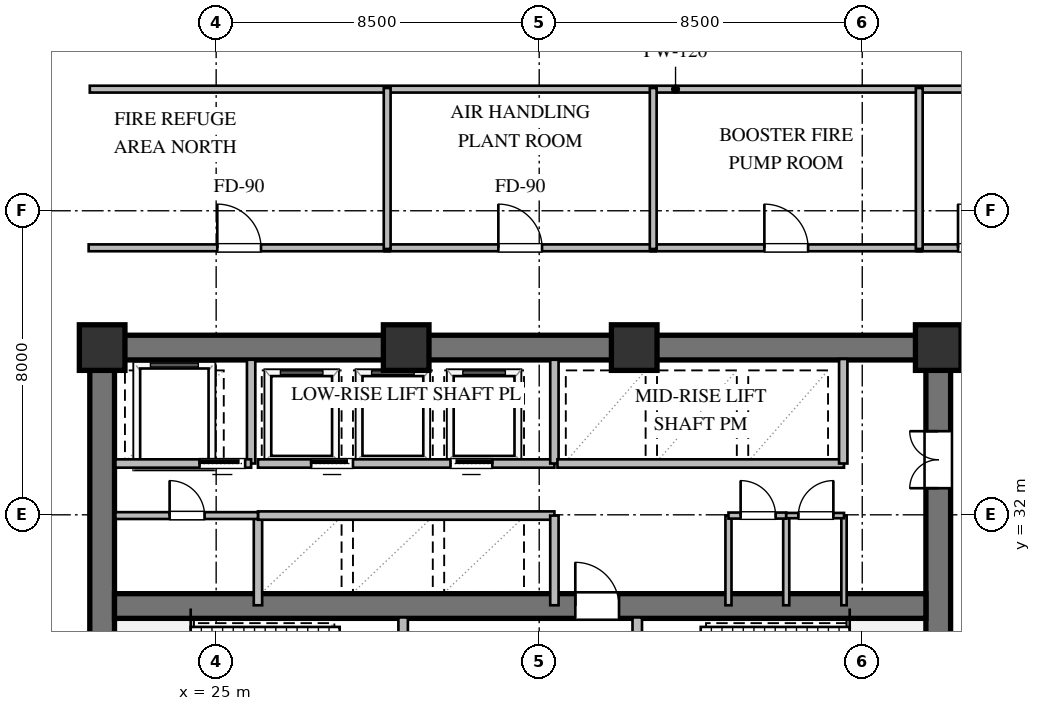
"""IFC4 building model, lengths in metres.
Left out: names, types, materials, properties, quantities, classifications, styles, units other than length and angle.
Written with IfcOpenShell. Run it as: python <this file> out.ifc"""

import sys

from ifc_helpers import new_model, si_unit, direction, frame, frame_2d, origin, origin_2d, place, context, subcontext, project, spatial, rectangle, extrude, element, fill, save


model = new_model("IFC4")
c1 = context("Model", 3, precision=1e-05, world=origin(), true_north=direction((0.0, 1.0)))
c2 = subcontext(c1, "Body", "Model", "MODEL_VIEW")
j1 = project(units=[si_unit("LENGTHUNIT", "METRE"), si_unit("PLANEANGLEUNIT", "RADIAN")], contexts=[c1])
p1 = place(None, origin())
s1 = spatial("IfcSite", under=j1, at=p1, CompositionType="ELEMENT")
p2 = place(p1, origin())
s2 = spatial("IfcBuilding", under=s1, at=p2, CompositionType="ELEMENT")
p3 = place(p2, frame((0.0, 0.0, 92.4)))
s3 = spatial("IfcBuildingStorey", under=s2, at=p3, CompositionType="ELEMENT", Elevation=92.4)
p4 = place(p3, frame((21.675, 36.4, 0.0), z_axis=(0.0, 0.0, 1.0), x_axis=(1.0, 0.0, 0.0)))
e1 = element("IfcWall", 1, at=p4, inside=s3, PredefinedType="SHEAR", context=c2, shape_type="SweptSolid", body=[
    extrude(rectangle(XDim=22.65, YDim=0.65, at=frame_2d((11.325, 0.0))), origin(), (0.0, 0.0, 1.0), 5.08),
])
p5 = place(p3, frame((22.0, 23.925, 0.0), z_axis=(0.0, 0.0, 1.0), x_axis=(0.0, 1.0, 0.0)))
e2 = element("IfcWall", 2, at=p5, inside=s3, PredefinedType="SHEAR", context=c2, shape_type="SweptSolid", body=[
    extrude(rectangle(XDim=12.15, YDim=0.65, at=frame_2d((6.075, 0.0))), origin(), (0.0, 0.0, 1.0), 5.08),
])
p6 = place(p3, frame((44.0, 23.925, 0.0), z_axis=(0.0, 0.0, 1.0), x_axis=(0.0, 1.0, 0.0)))
e3 = element("IfcWall", 3, at=p6, inside=s3, PredefinedType="SHEAR", context=c2, shape_type="SweptSolid", body=[
    extrude(rectangle(XDim=12.15, YDim=0.65, at=frame_2d((6.075, 0.0))), origin(), (0.0, 0.0, 1.0), 5.08),
])
p7 = place(p6, frame((8.775, 0.0, 0.0)))
e4 = element("IfcOpeningElement", 4, at=p7, cuts=e3, PredefinedType="OPENING", context=c2, shape_type="SweptSolid", body=[
    extrude(rectangle(XDim=1.5, YDim=2.15, at=frame_2d((0.75, 1.075))), frame((0.0, 0.335, 0.0), z_axis=(0.0, -1.0, 0.0), x_axis=(1.0, 0.0, 0.0)), (0.0, 0.0, 1.0), 0.67),
])
p8 = place(p3, frame((22.325, 29.6, 0.0), z_axis=(0.0, 0.0, 1.0), x_axis=(1.0, 0.0, 0.0)))
e5 = element("IfcWall", 5, at=p8, inside=s3, PredefinedType="SHEAR", context=c2, shape_type="SweptSolid", body=[
    extrude(rectangle(XDim=21.35, YDim=0.65, at=frame_2d((10.675, 0.0))), origin(), (0.0, 0.0, 1.0), 5.08),
])
p9 = place(p8, frame((12.125, 0.0, 0.0)))
e6 = element("IfcOpeningElement", 6, at=p9, cuts=e5, PredefinedType="OPENING", context=c2, shape_type="SweptSolid", body=[
    extrude(rectangle(XDim=1.15, YDim=2.1, at=frame_2d((0.575, 1.05))), frame((0.0, 0.335, 0.0), z_axis=(0.0, -1.0, 0.0), x_axis=(1.0, 0.0, 0.0)), (0.0, 0.0, 1.0), 0.67),
])
for number, where, z_axis, x_axis in (
    (7, (44.0, 36.4, 0.0), (0.0, 0.0, 1.0), (1.0, 0.0, 0.0)),
    (8, (36.0, 36.4, 0.0), (0.0, 0.0, 1.0), (1.0, 0.0, 0.0)),
    (9, (30.0, 36.4, 0.0), (0.0, 0.0, 1.0), (1.0, 0.0, 0.0)),
    (10, (22.0, 36.4, 0.0), (0.0, 0.0, 1.0), (1.0, 0.0, 0.0)),
):
    element("IfcColumn", number, at=place(p3, frame(where, z_axis=z_axis, x_axis=x_axis)), inside=s3, PredefinedType="COLUMN", context=c2, shape_type="SweptSolid", body=[
        extrude(rectangle(XDim=1.2, YDim=1.2, at=origin_2d()), origin(), (0.0, 0.0, 1.0), 5.4),
    ])
p10 = place(p3, frame((29.92, 23.9, 0.0), z_axis=(0.0, 0.0, 1.0), x_axis=(0.0, 1.0, 0.0)))
e11 = element("IfcWall", 11, at=p10, inside=s3, PredefinedType="SOLIDWALL", context=c2, shape_type="SweptSolid", body=[
    extrude(rectangle(XDim=5.4, YDim=0.25, at=frame_2d((2.7, 0.0))), origin(), (0.0, 0.0, 1.0), 3.57),
])
p11 = place(p10, frame((3.421, 0.0, 0.0)))
e12 = element("IfcOpeningElement", 12, at=p11, cuts=e11, PredefinedType="OPENING", context=c2, shape_type="SweptSolid", body=[
    extrude(rectangle(XDim=1.15, YDim=2.1, at=frame_2d((0.575, 1.05))), frame((0.0, 0.135, 0.0), z_axis=(0.0, -1.0, 0.0), x_axis=(1.0, 0.0, 0.0)), (0.0, 0.0, 1.0), 0.27),
])
p12 = place(p3, frame((36.08, 23.9, 0.0), z_axis=(0.0, 0.0, 1.0), x_axis=(0.0, 1.0, 0.0)))
e13 = element("IfcWall", 13, at=p12, inside=s3, PredefinedType="SOLIDWALL", context=c2, shape_type="SweptSolid", body=[
    extrude(rectangle(XDim=5.4, YDim=0.25, at=frame_2d((2.7, 0.0))), origin(), (0.0, 0.0, 1.0), 5.08),
])
p13 = place(p12, frame((3.421, 0.0, 0.0)))
e14 = element("IfcOpeningElement", 14, at=p13, cuts=e13, PredefinedType="OPENING", context=c2, shape_type="SweptSolid", body=[
    extrude(rectangle(XDim=1.15, YDim=2.1, at=frame_2d((0.575, 1.05))), frame((0.0, 0.135, 0.0), z_axis=(0.0, -1.0, 0.0), x_axis=(1.0, 0.0, 0.0)), (0.0, 0.0, 1.0), 0.27),
])
p14 = place(p3, frame((25.92, 33.35, 0.0), z_axis=(0.0, 0.0, 1.0), x_axis=(0.0, 1.0, 0.0)))
e15 = element("IfcWall", 15, at=p14, inside=s3, PredefinedType="SOLIDWALL", context=c2, shape_type="SweptSolid", body=[
    extrude(rectangle(XDim=2.73, YDim=0.22, at=frame_2d((1.365, 0.0))), origin(), (0.0, 0.0, 1.0), 5.08),
])
p15 = place(p3, frame((22.35, 33.35, 0.0), z_axis=(0.0, 0.0, 1.0), x_axis=(1.0, 0.0, 0.0)))
e16 = element("IfcWall", 16, at=p15, inside=s3, PredefinedType="SOLIDWALL", context=c2, shape_type="SweptSolid", body=[
    extrude(rectangle(XDim=3.57, YDim=0.22, at=frame_2d((1.785, 0.0))), origin(), (0.0, 0.0, 1.0), 5.08),
])
p16 = place(p15, frame((2.213, 0.0, 0.0)))
e17 = element("IfcOpeningElement", 17, at=p16, cuts=e16, PredefinedType="OPENING", context=c2, shape_type="SweptSolid", body=[
    extrude(rectangle(XDim=1.2, YDim=2.1, at=frame_2d((0.6, 1.05))), frame((0.0, 0.12, 0.0), z_axis=(0.0, -1.0, 0.0), x_axis=(1.0, 0.0, 0.0)), (0.0, 0.0, 1.0), 0.24),
])
p17 = place(p3, frame((26.1, 29.62, 0.0), z_axis=(0.0, 0.0, 1.0), x_axis=(0.0, 1.0, 0.0)))
e18 = element("IfcWall", 18, at=p17, inside=s3, PredefinedType="SOLIDWALL", context=c2, shape_type="SweptSolid", body=[
    extrude(rectangle(XDim=2.36, YDim=0.22, at=frame_2d((1.18, 0.0))), origin(), (0.0, 0.0, 1.0), 5.08),
])
p18 = place(p3, frame((26.1, 31.98, 0.0), z_axis=(0.0, 0.0, 1.0), x_axis=(1.0, 0.0, 0.0)))
e19 = element("IfcWall", 19, at=p18, inside=s3, PredefinedType="SOLIDWALL", context=c2, shape_type="SweptSolid", body=[
    extrude(rectangle(XDim=7.8, YDim=0.22, at=frame_2d((3.9, 0.0))), origin(), (0.0, 0.0, 1.0), 5.08),
])
p19 = place(p3, frame((33.9, 29.62, 0.0), z_axis=(0.0, 0.0, 1.0), x_axis=(0.0, 1.0, 0.0)))
e20 = element("IfcWall", 20, at=p19, inside=s3, PredefinedType="SOLIDWALL", context=c2, shape_type="SweptSolid", body=[
    extrude(rectangle(XDim=2.36, YDim=0.22, at=frame_2d((1.18, 0.0))), origin(), (0.0, 0.0, 1.0), 5.08),
])
p20 = place(p3, frame((26.1, 33.35, 0.0), z_axis=(0.0, 0.0, 1.0), x_axis=(1.0, 0.0, 0.0)))
e21 = element("IfcWall", 21, at=p20, inside=s3, PredefinedType="SOLIDWALL", context=c2, shape_type="SweptSolid", body=[
    extrude(rectangle(XDim=7.8, YDim=0.22, at=frame_2d((3.9, 0.0))), origin(), (0.0, 0.0, 1.0), 5.08),
])
p21 = place(p20, frame((1.4, 0.0, 0.0)))
e22 = element("IfcOpeningElement", 22, at=p21, cuts=e21, PredefinedType="OPENING", context=c2, shape_type="SweptSolid", body=[
    extrude(rectangle(XDim=1.1, YDim=2.1, at=frame_2d((0.55, 1.05))), frame((0.0, 0.12, 0.0), z_axis=(0.0, -1.0, 0.0), x_axis=(1.0, 0.0, 0.0)), (0.0, 0.0, 1.0), 0.24),
])
p22 = place(p20, frame((5.066, 0.0, 0.0)))
e23 = element("IfcOpeningElement", 23, at=p22, cuts=e21, PredefinedType="OPENING", context=c2, shape_type="SweptSolid", body=[
    extrude(rectangle(XDim=1.1, YDim=2.1, at=frame_2d((0.55, 1.05))), frame((0.0, 0.12, 0.0), z_axis=(0.0, -1.0, 0.0), x_axis=(1.0, 0.0, 0.0)), (0.0, 0.0, 1.0), 0.24),
])
p23 = place(p3, frame((33.9, 33.35, 0.0), z_axis=(0.0, 0.0, 1.0), x_axis=(0.0, 1.0, 0.0)))
e24 = element("IfcWall", 24, at=p23, inside=s3, PredefinedType="SOLIDWALL", context=c2, shape_type="SweptSolid", body=[
    extrude(rectangle(XDim=2.73, YDim=0.22, at=frame_2d((1.365, 0.0))), origin(), (0.0, 0.0, 1.0), 5.08),
])
p24 = place(p3, frame((33.98, 33.35, 0.0), z_axis=(0.0, 0.0, 1.0), x_axis=(1.0, 0.0, 0.0)))
e25 = element("IfcWall", 25, at=p24, inside=s3, PredefinedType="SOLIDWALL", context=c2, shape_type="SweptSolid", body=[
    extrude(rectangle(XDim=7.54, YDim=0.22, at=frame_2d((3.77, 0.0))), origin(), (0.0, 0.0, 1.0), 5.08),
])
p25 = place(p3, frame((41.5, 33.35, 0.0), z_axis=(0.0, 0.0, 1.0), x_axis=(0.0, 1.0, 0.0)))
e26 = element("IfcWall", 26, at=p25, inside=s3, PredefinedType="SOLIDWALL", context=c2, shape_type="SweptSolid", body=[
    extrude(rectangle(XDim=2.75, YDim=0.22, at=frame_2d((1.375, 0.0))), origin(), (0.0, 0.0, 1.0), 5.08),
])
p26 = place(p3, frame((22.35, 31.98, 0.0), z_axis=(0.0, 0.0, 1.0), x_axis=(1.0, 0.0, 0.0)))
e27 = element("IfcWall", 27, at=p26, inside=s3, PredefinedType="PARTITIONING", context=c2, shape_type="SweptSolid", body=[
    extrude(rectangle(XDim=3.75, YDim=0.18, at=frame_2d((1.875, 0.0))), origin(), (0.0, 0.0, 1.0), 5.08),
])
p27 = place(p26, frame((1.425, 0.0, 0.0)))
e28 = element("IfcOpeningElement", 28, at=p27, cuts=e27, PredefinedType="OPENING", context=c2, shape_type="SweptSolid", body=[
    extrude(rectangle(XDim=0.92, YDim=2.1, at=frame_2d((0.46, 1.05))), frame((0.0, 0.1, 0.0), z_axis=(0.0, -1.0, 0.0), x_axis=(1.0, 0.0, 0.0)), (0.0, 0.0, 1.0), 0.2),
])
for number, where, z_axis, x_axis in (
    (29, (38.48, 29.62, 0.0), (0.0, 0.0, 1.0), (0.0, 1.0, 0.0)),
    (30, (40.0, 29.62, 0.0), (0.0, 0.0, 1.0), (0.0, 1.0, 0.0)),
):
    element("IfcWall", number, at=place(p3, frame(where, z_axis=z_axis, x_axis=x_axis)), inside=s3, PredefinedType="PLUMBINGWALL", context=c2, shape_type="SweptSolid", body=[
        extrude(rectangle(XDim=2.36, YDim=0.16, at=frame_2d((1.18, 0.0))), origin(), (0.0, 0.0, 1.0), 5.08),
    ])
p28 = place(p3, frame((41.52, 29.62, 0.0), z_axis=(0.0, 0.0, 1.0), x_axis=(0.0, 1.0, 0.0)))
e31 = element("IfcWall", 31, at=p28, inside=s3, PredefinedType="PARTITIONING", context=c2, shape_type="SweptSolid", body=[
    extrude(rectangle(XDim=2.36, YDim=0.14, at=frame_2d((1.18, 0.0))), origin(), (0.0, 0.0, 1.0), 2.187),
])
p29 = place(p3, frame((38.48, 31.98, 0.0), z_axis=(0.0, 0.0, 1.0), x_axis=(1.0, 0.0, 0.0)))
e32 = element("IfcWall", 32, at=p29, inside=s3, PredefinedType="PLUMBINGWALL", context=c2, shape_type="SweptSolid", body=[
    extrude(rectangle(XDim=1.52, YDim=0.16, at=frame_2d((0.76, 0.0))), origin(), (0.0, 0.0, 1.0), 5.08),
])
p30 = place(p29, frame((0.32, 0.0, 0.0)))
e33 = element("IfcOpeningElement", 33, at=p30, cuts=e32, PredefinedType="OPENING", context=c2, shape_type="SweptSolid", body=[
    extrude(rectangle(XDim=0.92, YDim=2.1, at=frame_2d((0.46, 1.05))), frame((0.0, 0.09, 0.0), z_axis=(0.0, -1.0, 0.0), x_axis=(1.0, 0.0, 0.0)), (0.0, 0.0, 1.0), 0.18),
])
p31 = place(p3, frame((40.0, 31.98, 0.0), z_axis=(0.0, 0.0, 1.0), x_axis=(1.0, 0.0, 0.0)))
e34 = element("IfcWall", 34, at=p31, inside=s3, PredefinedType="PARTITIONING", context=c2, shape_type="SweptSolid", body=[
    extrude(rectangle(XDim=1.52, YDim=0.14, at=frame_2d((0.76, 0.0))), origin(), (0.0, 0.0, 1.0), 5.08),
])
p32 = place(p31, frame((0.32, 0.0, 0.0)))
e35 = element("IfcOpeningElement", 35, at=p32, cuts=e34, PredefinedType="OPENING", context=c2, shape_type="SweptSolid", body=[
    extrude(rectangle(XDim=0.92, YDim=2.1, at=frame_2d((0.46, 1.05))), frame((0.0, 0.08, 0.0), z_axis=(0.0, -1.0, 0.0), x_axis=(1.0, 0.0, 0.0)), (0.0, 0.0, 1.0), 0.16),
])
p33 = place(p3, frame((21.675, 43.2, 0.0), z_axis=(0.0, 0.0, 1.0), x_axis=(1.0, 0.0, 0.0)))
e36 = element("IfcWall", 36, at=p33, inside=s3, PredefinedType="PARTITIONING", context=c2, shape_type="SweptSolid", body=[
    extrude(rectangle(XDim=30.825, YDim=0.18, at=frame_2d((15.413, 0.0))), origin(), (0.0, 0.0, 1.0), 5.08),
])
p34 = place(p3, frame((21.645, 39.025, 0.0), z_axis=(0.0, 0.0, 1.0), x_axis=(1.0, 0.0, 0.0)))
e37 = element("IfcWall", 37, at=p34, inside=s3, PredefinedType="PARTITIONING", context=c2, shape_type="SweptSolid", body=[
    extrude(rectangle(XDim=7.92, YDim=0.18, at=frame_2d((3.96, 0.0))), origin(), (0.0, 0.0, 1.0), 5.08),
])
p35 = place(p34, frame((3.385, 0.0, 0.0)))
e38 = element("IfcOpeningElement", 38, at=p35, cuts=e37, PredefinedType="OPENING", context=c2, shape_type="SweptSolid", body=[
    extrude(rectangle(XDim=1.15, YDim=2.1, at=frame_2d((0.575, 1.05))), frame((0.0, 0.1, 0.0), z_axis=(0.0, -1.0, 0.0), x_axis=(1.0, 0.0, 0.0)), (0.0, 0.0, 1.0), 0.2),
])
p36 = place(p3, frame((29.435, 39.025, 0.0), z_axis=(0.0, 0.0, 1.0), x_axis=(1.0, 0.0, 0.0)))
e39 = element("IfcWall", 39, at=p36, inside=s3, PredefinedType="PARTITIONING", context=c2, shape_type="SweptSolid", body=[
    extrude(rectangle(XDim=7.13, YDim=0.18, at=frame_2d((3.565, 0.0))), origin(), (0.0, 0.0, 1.0), 5.08),
])
p37 = place(p36, frame((2.99, 0.0, 0.0)))
e40 = element("IfcOpeningElement", 40, at=p37, cuts=e39, PredefinedType="OPENING", context=c2, shape_type="SweptSolid", body=[
    extrude(rectangle(XDim=1.15, YDim=2.1, at=frame_2d((0.575, 1.05))), frame((0.0, 0.1, 0.0), z_axis=(0.0, -1.0, 0.0), x_axis=(1.0, 0.0, 0.0)), (0.0, 0.0, 1.0), 0.2),
])
p38 = place(p3, frame((36.435, 39.025, 0.0), z_axis=(0.0, 0.0, 1.0), x_axis=(1.0, 0.0, 0.0)))
e41 = element("IfcWall", 41, at=p38, inside=s3, PredefinedType="PARTITIONING", context=c2, shape_type="SweptSolid", body=[
    extrude(rectangle(XDim=7.13, YDim=0.18, at=frame_2d((3.565, 0.0))), origin(), (0.0, 0.0, 1.0), 5.08),
])
p39 = place(p38, frame((2.99, 0.0, 0.0)))
e42 = element("IfcOpeningElement", 42, at=p39, cuts=e41, PredefinedType="OPENING", context=c2, shape_type="SweptSolid", body=[
    extrude(rectangle(XDim=1.15, YDim=2.1, at=frame_2d((0.575, 1.05))), frame((0.0, 0.1, 0.0), z_axis=(0.0, -1.0, 0.0), x_axis=(1.0, 0.0, 0.0)), (0.0, 0.0, 1.0), 0.2),
])
p40 = place(p3, frame((43.435, 39.025, 0.0), z_axis=(0.0, 0.0, 1.0), x_axis=(1.0, 0.0, 0.0)))
e43 = element("IfcWall", 43, at=p40, inside=s3, PredefinedType="PARTITIONING", context=c2, shape_type="SweptSolid", body=[
    extrude(rectangle(XDim=3.32, YDim=0.18, at=frame_2d((1.66, 0.0))), origin(), (0.0, 0.0, 1.0), 5.08),
])
p41 = place(p40, frame((1.085, 0.0, 0.0)))
e44 = element("IfcOpeningElement", 44, at=p41, cuts=e43, PredefinedType="OPENING", context=c2, shape_type="SweptSolid", body=[
    extrude(rectangle(XDim=1.15, YDim=2.1, at=frame_2d((0.575, 1.05))), frame((0.0, 0.1, 0.0), z_axis=(0.0, -1.0, 0.0), x_axis=(1.0, 0.0, 0.0)), (0.0, 0.0, 1.0), 0.2),
])
for number, where, z_axis, x_axis in (
    (45, (29.5, 43.23, 0.0), (0.0, 0.0, 1.0), (0.0, -1.0, 0.0)),
    (46, (36.5, 43.23, 0.0), (0.0, 0.0, 1.0), (0.0, -1.0, 0.0)),
):
    element("IfcWall", number, at=place(p3, frame(where, z_axis=z_axis, x_axis=x_axis)), inside=s3, PredefinedType="PARTITIONING", context=c2, shape_type="SweptSolid", body=[
        extrude(rectangle(XDim=4.235, YDim=0.18, at=frame_2d((2.117, 0.0))), origin(), (0.0, 0.0, 1.0), 5.08),
    ])
p42 = place(p3, frame((43.5, 43.23, 0.0), z_axis=(0.0, 0.0, 1.0), x_axis=(0.0, -1.0, 0.0)))
e47 = element("IfcWall", 47, at=p42, inside=s3, PredefinedType="PARTITIONING", context=c2, shape_type="SweptSolid", body=[
    extrude(rectangle(XDim=4.235, YDim=0.18, at=frame_2d((2.117, 0.0))), origin(), (0.0, 0.0, 1.0), 3.57),
])
p43 = place(p9, origin())
e48 = element("IfcDoor", 48, at=p43, inside=s3, OperationType="SINGLE_SWING_LEFT", PredefinedType="DOOR", context=c2, shape_type="SweptSolid", body=[
    extrude(rectangle(XDim=1.15, YDim=2.1, at=frame_2d((0.575, 1.05))), frame((0.0, 0.025, 0.0), z_axis=(0.0, -1.0, 0.0), x_axis=(1.0, 0.0, 0.0)), (0.0, 0.0, 1.0), 0.05),
])
fill(e6, e48)
p44 = place(p7, origin())
e49 = element("IfcDoor", 49, at=p44, inside=s3, OperationType="DOUBLE_DOOR_SINGLE_SWING", PredefinedType="DOOR", context=c2, shape_type="SweptSolid", body=[
    extrude(rectangle(XDim=1.5, YDim=2.15, at=frame_2d((0.75, 1.075))), frame((0.0, 0.025, 0.0), z_axis=(0.0, -1.0, 0.0), x_axis=(1.0, 0.0, 0.0)), (0.0, 0.0, 1.0), 0.05),
])
fill(e4, e49)
p45 = place(p16, origin())
e50 = element("IfcDoor", 50, at=p45, inside=s3, OperationType="SLIDING_TO_LEFT", PredefinedType="DOOR", context=c2, shape_type="SweptSolid", body=[
    extrude(rectangle(XDim=1.2, YDim=2.1, at=frame_2d((0.6, 1.05))), frame((0.0, 0.025, 0.0), z_axis=(0.0, -1.0, 0.0), x_axis=(1.0, 0.0, 0.0)), (0.0, 0.0, 1.0), 0.05),
])
fill(e17, e50)
p46 = place(p21, origin())
e51 = element("IfcDoor", 51, at=p46, inside=s3, OperationType="SLIDING_TO_LEFT", PredefinedType="DOOR", context=c2, shape_type="SweptSolid", body=[
    extrude(rectangle(XDim=1.1, YDim=2.1, at=frame_2d((0.55, 1.05))), frame((0.0, 0.025, 0.0), z_axis=(0.0, -1.0, 0.0), x_axis=(1.0, 0.0, 0.0)), (0.0, 0.0, 1.0), 0.05),
])
fill(e22, e51)
p47 = place(p22, origin())
e52 = element("IfcDoor", 52, at=p47, inside=s3, OperationType="SLIDING_TO_RIGHT", PredefinedType="DOOR", context=c2, shape_type="SweptSolid", body=[
    extrude(rectangle(XDim=1.1, YDim=2.1, at=frame_2d((0.55, 1.05))), frame((0.0, 0.025, 0.0), z_axis=(0.0, -1.0, 0.0), x_axis=(1.0, 0.0, 0.0)), (0.0, 0.0, 1.0), 0.05),
])
fill(e23, e52)
p48 = place(p27, origin())
e53 = element("IfcDoor", 53, at=p48, inside=s3, OperationType="SINGLE_SWING_LEFT", PredefinedType="DOOR", context=c2, shape_type="SweptSolid", body=[
    extrude(rectangle(XDim=0.92, YDim=2.1, at=frame_2d((0.46, 1.05))), frame((0.0, 0.025, 0.0), z_axis=(0.0, -1.0, 0.0), x_axis=(1.0, 0.0, 0.0)), (0.0, 0.0, 1.0), 0.05),
])
fill(e28, e53)
p49 = place(p30, origin())
e54 = element("IfcDoor", 54, at=p49, inside=s3, OperationType="SINGLE_SWING_LEFT", PredefinedType="DOOR", context=c2, shape_type="SweptSolid", body=[
    extrude(rectangle(XDim=0.92, YDim=2.1, at=frame_2d((0.46, 1.05))), frame((0.0, 0.025, 0.0), z_axis=(0.0, -1.0, 0.0), x_axis=(1.0, 0.0, 0.0)), (0.0, 0.0, 1.0), 0.05),
])
fill(e33, e54)
p50 = place(p32, origin())
e55 = element("IfcDoor", 55, at=p50, inside=s3, OperationType="SINGLE_SWING_RIGHT", PredefinedType="DOOR", context=c2, shape_type="SweptSolid", body=[
    extrude(rectangle(XDim=0.92, YDim=2.1, at=frame_2d((0.46, 1.05))), frame((0.0, 0.025, 0.0), z_axis=(0.0, -1.0, 0.0), x_axis=(1.0, 0.0, 0.0)), (0.0, 0.0, 1.0), 0.05),
])
fill(e35, e55)
p51 = place(p35, origin())
e56 = element("IfcDoor", 56, at=p51, inside=s3, OperationType="SINGLE_SWING_LEFT", PredefinedType="DOOR", context=c2, shape_type="SweptSolid", body=[
    extrude(rectangle(XDim=1.15, YDim=2.1, at=frame_2d((0.575, 1.05))), frame((0.0, 0.025, 0.0), z_axis=(0.0, -1.0, 0.0), x_axis=(1.0, 0.0, 0.0)), (0.0, 0.0, 1.0), 0.05),
])
fill(e38, e56)
p52 = place(p37, origin())
e57 = element("IfcDoor", 57, at=p52, inside=s3, OperationType="SINGLE_SWING_LEFT", PredefinedType="DOOR", context=c2, shape_type="SweptSolid", body=[
    extrude(rectangle(XDim=1.15, YDim=2.1, at=frame_2d((0.575, 1.05))), frame((0.0, 0.025, 0.0), z_axis=(0.0, -1.0, 0.0), x_axis=(1.0, 0.0, 0.0)), (0.0, 0.0, 1.0), 0.05),
])
fill(e40, e57)
p53 = place(p39, origin())
e58 = element("IfcDoor", 58, at=p53, inside=s3, OperationType="SINGLE_SWING_LEFT", PredefinedType="DOOR", context=c2, shape_type="SweptSolid", body=[
    extrude(rectangle(XDim=1.15, YDim=2.1, at=frame_2d((0.575, 1.05))), frame((0.0, 0.025, 0.0), z_axis=(0.0, -1.0, 0.0), x_axis=(1.0, 0.0, 0.0)), (0.0, 0.0, 1.0), 0.05),
])
fill(e42, e58)
p54 = place(p41, origin())
e59 = element("IfcDoor", 59, at=p54, inside=s3, OperationType="SINGLE_SWING_LEFT", PredefinedType="DOOR", context=c2, shape_type="SweptSolid", body=[
    extrude(rectangle(XDim=1.15, YDim=2.1, at=frame_2d((0.575, 1.05))), frame((0.0, 0.025, 0.0), z_axis=(0.0, -1.0, 0.0), x_axis=(1.0, 0.0, 0.0)), (0.0, 0.0, 1.0), 0.05),
])
fill(e44, e59)
save(model, sys.argv[1])
